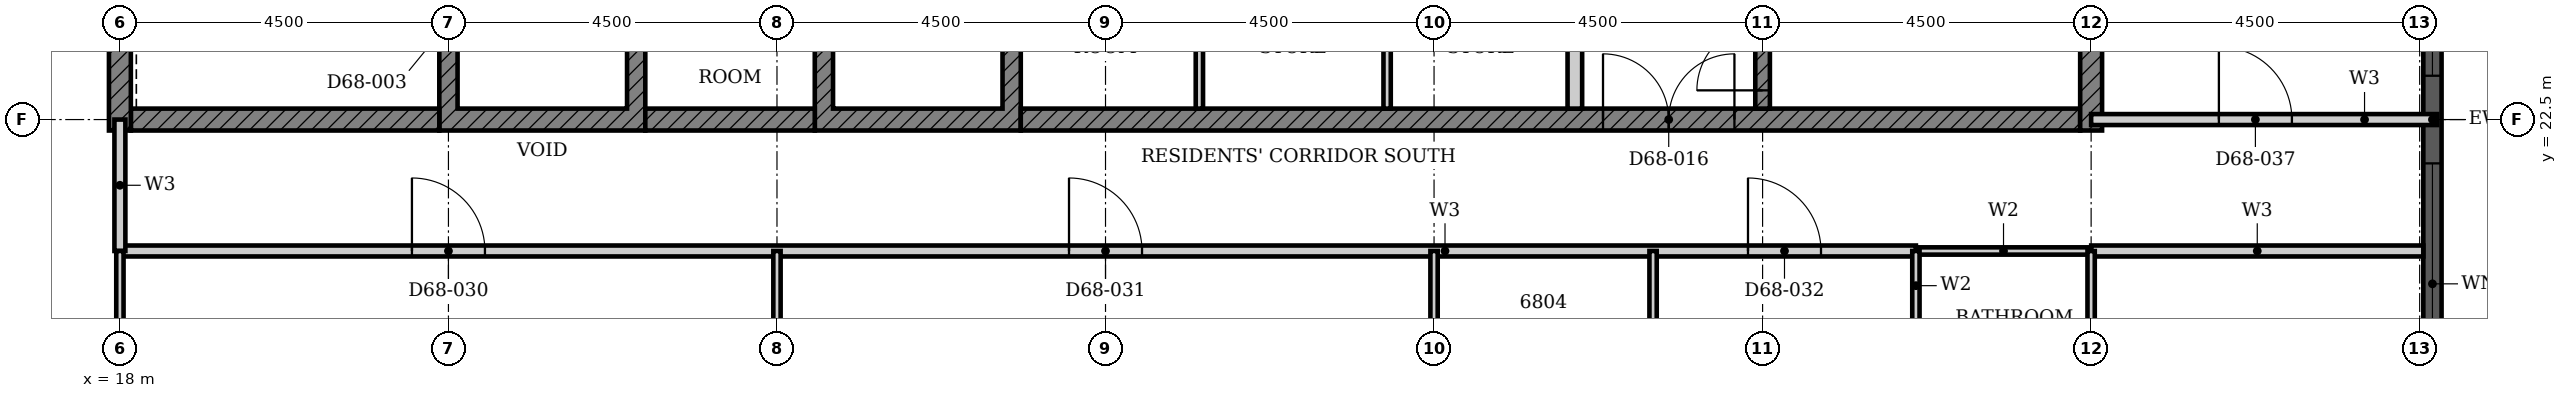
"""IFC4 building model, lengths in metres.
Left out: names, types, materials, properties, quantities, classifications, styles, units other than length and angle.
Written with IfcOpenShell. Run it as: python <this file> out.ifc"""

import sys

from ifc_helpers import new_model, si_unit, direction, frame, frame_2d, origin, place, context, subcontext, project, spatial, polyline, rectangle, outline, extrude, element, fill, save


model = new_model("IFC4")
c1 = context("Model", 3, precision=1e-05, world=origin(), true_north=direction((0.0, 1.0)))
c2 = subcontext(c1, "Body", "Model", "MODEL_VIEW")
j1 = project(units=[si_unit("LENGTHUNIT", "METRE"), si_unit("PLANEANGLEUNIT", "RADIAN")], contexts=[c1])
p1 = place(None, origin())
s1 = spatial("IfcSite", under=j1, at=p1, CompositionType="ELEMENT")
p2 = place(p1, origin())
s2 = spatial("IfcBuilding", under=s1, at=p2, CompositionType="ELEMENT")
p3 = place(p2, frame((0.0, 0.0, 267.5)))
s3 = spatial("IfcBuildingStorey", under=s2, at=p3, CompositionType="ELEMENT", Elevation=267.5)
p4 = place(p3, frame((49.675, 18.3, 0.0), z_axis=(0.0, 0.0, 1.0), x_axis=(0.0, 1.0, 0.0)))
e1 = element("IfcWall", 1, at=p4, inside=s3, PredefinedType="SOLIDWALL", context=c2, shape_type="SweptSolid", body=[
    extrude(rectangle(XDim=8.4, YDim=0.25, at=frame_2d((4.2, 0.0))), origin(), (0.0, 0.0, 1.0), 3.7),
])
p5 = place(p4, frame((0.3, 0.0, 0.45)))
e2 = element("IfcOpeningElement", 2, at=p5, cuts=e1, PredefinedType="OPENING", context=c2, shape_type="SweptSolid", body=[
    extrude(rectangle(XDim=3.3, YDim=2.3, at=frame_2d((1.65, 1.15))), frame((0.0, 0.135, 0.0), z_axis=(0.0, -1.0, 0.0), x_axis=(1.0, 0.0, 0.0)), (0.0, 0.0, 1.0), 0.27),
])
p6 = place(p4, frame((4.8, 0.0, 0.45)))
e3 = element("IfcOpeningElement", 3, at=p6, cuts=e1, PredefinedType="OPENING", context=c2, shape_type="SweptSolid", body=[
    extrude(rectangle(XDim=3.3, YDim=2.3, at=frame_2d((1.65, 1.15))), frame((0.0, 0.135, 0.0), z_axis=(0.0, -1.0, 0.0), x_axis=(1.0, 0.0, 0.0)), (0.0, 0.0, 1.0), 0.27),
])
p7 = place(p3, origin())
e4 = element("IfcWall", 4, at=p7, inside=s3, PredefinedType="SHEAR", context=c2, shape_type="SweptSolid", body=[
    extrude(outline(polyline([(22.375, 22.35), (25.197, 22.35), (25.197, 25.275), (24.947, 25.275), (24.947, 22.65), (22.625, 22.65), (22.625, 25.275), (22.375, 25.275), (22.375, 22.35)])), origin(), (0.0, 0.0, 1.0), 3.4),
])
p8 = place(p3, origin())
e5 = element("IfcWall", 5, at=p8, inside=s3, PredefinedType="SHEAR", context=c2, shape_type="SweptSolid", body=[
    extrude(outline(polyline([(27.518, 22.35), (30.339, 22.35), (30.339, 25.275), (30.089, 25.275), (30.089, 22.65), (27.768, 22.65), (27.768, 25.275), (27.518, 25.275), (27.518, 22.35)])), origin(), (0.0, 0.0, 1.0), 3.4),
])
p9 = place(p3, frame((18.15, 22.5, 0.0), z_axis=(0.0, 0.0, 1.0), x_axis=(1.0, 0.0, 0.0)))
e6 = element("IfcWall", 6, at=p9, inside=s3, PredefinedType="SHEAR", context=c2, shape_type="SweptSolid", body=[
    extrude(rectangle(XDim=4.225, YDim=0.3, at=frame_2d((2.113, 0.0))), origin(), (0.0, 0.0, 1.0), 3.4),
])
p10 = place(p3, frame((25.197, 22.5, 0.0), z_axis=(0.0, 0.0, 1.0), x_axis=(1.0, 0.0, 0.0)))
e7 = element("IfcWall", 7, at=p10, inside=s3, PredefinedType="SHEAR", context=c2, shape_type="SweptSolid", body=[
    extrude(rectangle(XDim=2.321, YDim=0.3, at=frame_2d((1.161, 0.0))), origin(), (0.0, 0.0, 1.0), 3.4),
])
p11 = place(p3, frame((30.339, 22.5, 0.0), z_axis=(0.0, 0.0, 1.0), x_axis=(1.0, 0.0, 0.0)))
e8 = element("IfcWall", 8, at=p11, inside=s3, PredefinedType="SHEAR", context=c2, shape_type="SweptSolid", body=[
    extrude(rectangle(XDim=14.511, YDim=0.3, at=frame_2d((7.255, 0.0))), origin(), (0.0, 0.0, 1.0), 3.4),
])
p12 = place(p11, frame((7.975, 0.0, 0.0)))
e9 = element("IfcOpeningElement", 9, at=p12, cuts=e8, PredefinedType="OPENING", context=c2, shape_type="SweptSolid", body=[
    extrude(rectangle(XDim=1.8, YDim=2.1, at=frame_2d((0.9, 1.05))), frame((0.0, 0.16, 0.0), z_axis=(0.0, -1.0, 0.0), x_axis=(1.0, 0.0, 0.0)), (0.0, 0.0, 1.0), 0.32),
])
for number, where, z_axis, x_axis in (
    (10, (18.0, 22.35, 0.0), (0.0, 0.0, 1.0), (0.0, 1.0, 0.0)),
    (11, (45.0, 22.35, 0.0), (0.0, 0.0, 1.0), (0.0, 1.0, 0.0)),
):
    element("IfcWall", number, at=place(p3, frame(where, z_axis=z_axis, x_axis=x_axis)), inside=s3, PredefinedType="SHEAR", context=c2, shape_type="SweptSolid", body=[
        extrude(rectangle(XDim=9.3, YDim=0.3, at=frame_2d((4.65, 0.0))), origin(), (0.0, 0.0, 1.0), 3.4),
    ])
p13 = place(p3, frame((37.928, 22.65, 0.0), z_axis=(0.0, 0.0, 1.0), x_axis=(0.0, 1.0, 0.0)))
e12 = element("IfcWall", 12, at=p13, inside=s3, PredefinedType="PARTITIONING", context=c2, shape_type="SweptSolid", body=[
    extrude(rectangle(XDim=2.625, YDim=0.2, at=frame_2d((1.312, 0.0))), origin(), (0.0, 0.0, 1.0), 3.4),
])
for number, where, z_axis, x_axis in (
    (13, (32.786, 22.65, 0.0), (0.0, 0.0, 1.0), (0.0, 1.0, 0.0)),
    (14, (35.357, 22.65, 0.0), (0.0, 0.0, 1.0), (0.0, 1.0, 0.0)),
):
    element("IfcWall", number, at=place(p3, frame(where, z_axis=z_axis, x_axis=x_axis)), inside=s3, PredefinedType="PARTITIONING", context=c2, shape_type="SweptSolid", body=[
        extrude(rectangle(XDim=2.625, YDim=0.1, at=frame_2d((1.312, 0.0))), origin(), (0.0, 0.0, 1.0), 3.4),
    ])
p14 = place(p3, frame((40.5, 22.65, 0.0), z_axis=(0.0, 0.0, 1.0), x_axis=(0.0, 1.0, 0.0)))
e15 = element("IfcWall", 15, at=p14, inside=s3, PredefinedType="SHEAR", context=c2, shape_type="SweptSolid", body=[
    extrude(rectangle(XDim=5.825, YDim=0.2, at=frame_2d((2.913, 0.0))), origin(), (0.0, 0.0, 1.0), 3.4),
])
p15 = place(p14, frame((0.25, 0.0, 0.0)))
e16 = element("IfcOpeningElement", 16, at=p15, cuts=e15, PredefinedType="OPENING", context=c2, shape_type="SweptSolid", body=[
    extrude(rectangle(XDim=1.8, YDim=2.1, at=frame_2d((0.9, 1.05))), frame((0.0, 0.11, 0.0), z_axis=(0.0, -1.0, 0.0), x_axis=(1.0, 0.0, 0.0)), (0.0, 0.0, 1.0), 0.22),
])
p16 = place(p3, frame((18.0, 20.7, 0.0), z_axis=(0.0, 0.0, 1.0), x_axis=(1.0, 0.0, 0.0)))
e17 = element("IfcWall", 17, at=p16, inside=s3, PredefinedType="PARTITIONING", context=c2, shape_type="SweptSolid", body=[
    extrude(rectangle(XDim=24.6, YDim=0.15, at=frame_2d((12.3, 0.0))), origin(), (0.0, 0.0, 1.0), 3.4),
])
p17 = place(p16, frame((4.0, 0.0, 0.0)))
e18 = element("IfcOpeningElement", 18, at=p17, cuts=e17, PredefinedType="OPENING", context=c2, shape_type="SweptSolid", body=[
    extrude(rectangle(XDim=1.0, YDim=2.1, at=frame_2d((0.5, 1.05))), frame((0.0, 0.085, 0.0), z_axis=(0.0, -1.0, 0.0), x_axis=(1.0, 0.0, 0.0)), (0.0, 0.0, 1.0), 0.17),
])
p18 = place(p16, frame((13.0, 0.0, 0.0)))
e19 = element("IfcOpeningElement", 19, at=p18, cuts=e17, PredefinedType="OPENING", context=c2, shape_type="SweptSolid", body=[
    extrude(rectangle(XDim=1.0, YDim=2.1, at=frame_2d((0.5, 1.05))), frame((0.0, 0.085, 0.0), z_axis=(0.0, -1.0, 0.0), x_axis=(1.0, 0.0, 0.0)), (0.0, 0.0, 1.0), 0.17),
])
p19 = place(p16, frame((22.3, 0.0, 0.0)))
e20 = element("IfcOpeningElement", 20, at=p19, cuts=e17, PredefinedType="OPENING", context=c2, shape_type="SweptSolid", body=[
    extrude(rectangle(XDim=1.0, YDim=2.2, at=frame_2d((0.5, 1.1))), frame((0.0, 0.085, 0.0), z_axis=(0.0, -1.0, 0.0), x_axis=(1.0, 0.0, 0.0)), (0.0, 0.0, 1.0), 0.17),
])
p20 = place(p3, frame((45.001, 20.7, 0.0), z_axis=(0.0, 0.0, 1.0), x_axis=(1.0, 0.0, 0.0)))
e21 = element("IfcWall", 21, at=p20, inside=s3, PredefinedType="PARTITIONING", context=c2, shape_type="SweptSolid", body=[
    extrude(rectangle(XDim=4.549, YDim=0.15, at=frame_2d((2.274, 0.0))), origin(), (0.0, 0.0, 1.0), 3.4),
])
p21 = place(p3, frame((45.0, 22.5, 0.0), z_axis=(0.0, 0.0, 1.0), x_axis=(1.0, 0.0, 0.0)))
e22 = element("IfcWall", 22, at=p21, inside=s3, PredefinedType="PARTITIONING", context=c2, shape_type="SweptSolid", body=[
    extrude(rectangle(XDim=4.74, YDim=0.15, at=frame_2d((2.37, 0.0))), origin(), (0.0, 0.0, 1.0), 3.4),
])
p22 = place(p21, frame((1.75, 0.0, 0.0)))
e23 = element("IfcOpeningElement", 23, at=p22, cuts=e22, PredefinedType="OPENING", context=c2, shape_type="SweptSolid", body=[
    extrude(rectangle(XDim=1.0, YDim=2.1, at=frame_2d((0.5, 1.05))), frame((0.0, 0.085, 0.0), z_axis=(0.0, -1.0, 0.0), x_axis=(1.0, 0.0, 0.0)), (0.0, 0.0, 1.0), 0.17),
])
p23 = place(p3, frame((18.0, 20.7, 0.0), z_axis=(0.0, 0.0, 1.0), x_axis=(0.0, 1.0, 0.0)))
e24 = element("IfcWall", 24, at=p23, inside=s3, PredefinedType="PARTITIONING", context=c2, shape_type="SweptSolid", body=[
    extrude(rectangle(XDim=1.8, YDim=0.15, at=frame_2d((0.9, 0.0))), origin(), (0.0, 0.0, 1.0), 3.4),
])
p24 = place(p3, frame((18.0, 18.0, 0.0), z_axis=(0.0, 0.0, 1.0), x_axis=(0.0, 1.0, 0.0)))
e25 = element("IfcWall", 25, at=p24, inside=s3, PredefinedType="PARTITIONING", context=c2, shape_type="SweptSolid", body=[
    extrude(rectangle(XDim=2.7, YDim=0.1, at=frame_2d((1.35, 0.0))), origin(), (0.0, 0.0, 1.0), 3.4),
])
for number, where, z_axis, x_axis in (
    (26, (27.0, 13.31, 0.0), (0.0, 0.0, 1.0), (0.0, 1.0, 0.0)),
    (27, (36.0, 13.31, 0.0), (0.0, 0.0, 1.0), (0.0, 1.0, 0.0)),
):
    element("IfcWall", number, at=place(p3, frame(where, z_axis=z_axis, x_axis=x_axis)), inside=s3, PredefinedType="PARTITIONING", context=c2, shape_type="SweptSolid", body=[
        extrude(rectangle(XDim=7.39, YDim=0.1, at=frame_2d((3.695, 0.0))), origin(), (0.0, 0.0, 1.0), 3.4),
    ])
p25 = place(p3, frame((39.0, 18.0, 0.0), z_axis=(0.0, 0.0, 1.0), x_axis=(0.0, 1.0, 0.0)))
e28 = element("IfcWall", 28, at=p25, inside=s3, PredefinedType="PARTITIONING", context=c2, shape_type="SweptSolid", body=[
    extrude(rectangle(XDim=2.7, YDim=0.1, at=frame_2d((1.35, 0.0))), origin(), (0.0, 0.0, 1.0), 3.4),
])
p26 = place(p3, frame((42.6, 20.7, 0.0), z_axis=(0.0, 0.0, 1.0), x_axis=(1.0, 0.0, 0.0)))
e29 = element("IfcWall", 29, at=p26, inside=s3, PredefinedType="PARTITIONING", context=c2, shape_type="SweptSolid", body=[
    extrude(rectangle(XDim=2.4, YDim=0.1, at=frame_2d((1.2, 0.0))), origin(), (0.0, 0.0, 1.0), 3.4),
])
p27 = place(p3, frame((42.6, 18.0, 0.0), z_axis=(0.0, 0.0, 1.0), x_axis=(0.0, 1.0, 0.0)))
e30 = element("IfcWall", 30, at=p27, inside=s3, PredefinedType="PARTITIONING", context=c2, shape_type="SweptSolid", body=[
    extrude(rectangle(XDim=2.7, YDim=0.1, at=frame_2d((1.35, 0.0))), origin(), (0.0, 0.0, 1.0), 3.4),
])
p28 = place(p27, frame((0.95, 0.0, 0.0)))
e31 = element("IfcOpeningElement", 31, at=p28, cuts=e30, PredefinedType="OPENING", context=c2, shape_type="SweptSolid", body=[
    extrude(rectangle(XDim=0.8, YDim=2.1, at=frame_2d((0.4, 1.05))), frame((0.0, 0.06, 0.0), z_axis=(0.0, -1.0, 0.0), x_axis=(1.0, 0.0, 0.0)), (0.0, 0.0, 1.0), 0.12),
])
p29 = place(p3, frame((45.0, 18.0, 0.0), z_axis=(0.0, 0.0, 1.0), x_axis=(0.0, 1.0, 0.0)))
e32 = element("IfcWall", 32, at=p29, inside=s3, PredefinedType="PARTITIONING", context=c2, shape_type="SweptSolid", body=[
    extrude(rectangle(XDim=2.699, YDim=0.1, at=frame_2d((1.35, 0.0))), origin(), (0.0, 0.0, 1.0), 3.4),
])
p30 = place(p5, origin())
e33 = element("IfcWindow", 33, at=p30, inside=s3, PartitioningType="SINGLE_PANEL", PredefinedType="WINDOW", context=c2, shape_type="SweptSolid", body=[
    extrude(rectangle(XDim=3.3, YDim=2.3, at=frame_2d((1.65, 1.15))), frame((0.0, 0.03, 0.0), z_axis=(0.0, -1.0, 0.0), x_axis=(1.0, 0.0, 0.0)), (0.0, 0.0, 1.0), 0.06),
])
fill(e2, e33)
p31 = place(p6, origin())
e34 = element("IfcWindow", 34, at=p31, inside=s3, PartitioningType="SINGLE_PANEL", PredefinedType="WINDOW", context=c2, shape_type="SweptSolid", body=[
    extrude(rectangle(XDim=3.3, YDim=2.3, at=frame_2d((1.65, 1.15))), frame((0.0, 0.03, 0.0), z_axis=(0.0, -1.0, 0.0), x_axis=(1.0, 0.0, 0.0)), (0.0, 0.0, 1.0), 0.06),
])
fill(e3, e34)
p32 = place(p15, origin())
e35 = element("IfcDoor", 35, at=p32, inside=s3, OperationType="DOUBLE_DOOR_SINGLE_SWING", PredefinedType="DOOR", context=c2, shape_type="SweptSolid", body=[
    extrude(rectangle(XDim=1.8, YDim=2.1, at=frame_2d((0.9, 1.05))), frame((0.0, 0.025, 0.0), z_axis=(0.0, -1.0, 0.0), x_axis=(1.0, 0.0, 0.0)), (0.0, 0.0, 1.0), 0.05),
])
fill(e16, e35)
p33 = place(p12, origin())
e36 = element("IfcDoor", 36, at=p33, inside=s3, OperationType="DOUBLE_DOOR_SINGLE_SWING", PredefinedType="DOOR", context=c2, shape_type="SweptSolid", body=[
    extrude(rectangle(XDim=1.8, YDim=2.1, at=frame_2d((0.9, 1.05))), frame((0.0, 0.025, 0.0), z_axis=(0.0, -1.0, 0.0), x_axis=(1.0, 0.0, 0.0)), (0.0, 0.0, 1.0), 0.05),
])
fill(e9, e36)
p34 = place(p17, origin())
e37 = element("IfcDoor", 37, at=p34, inside=s3, OperationType="SINGLE_SWING_LEFT", PredefinedType="DOOR", context=c2, shape_type="SweptSolid", body=[
    extrude(rectangle(XDim=1.0, YDim=2.1, at=frame_2d((0.5, 1.05))), frame((0.0, 0.025, 0.0), z_axis=(0.0, -1.0, 0.0), x_axis=(1.0, 0.0, 0.0)), (0.0, 0.0, 1.0), 0.05),
])
fill(e18, e37)
p35 = place(p18, origin())
e38 = element("IfcDoor", 38, at=p35, inside=s3, OperationType="SINGLE_SWING_LEFT", PredefinedType="DOOR", context=c2, shape_type="SweptSolid", body=[
    extrude(rectangle(XDim=1.0, YDim=2.1, at=frame_2d((0.5, 1.05))), frame((0.0, 0.025, 0.0), z_axis=(0.0, -1.0, 0.0), x_axis=(1.0, 0.0, 0.0)), (0.0, 0.0, 1.0), 0.05),
])
fill(e19, e38)
p36 = place(p19, origin())
e39 = element("IfcDoor", 39, at=p36, inside=s3, OperationType="SINGLE_SWING_LEFT", PredefinedType="DOOR", context=c2, shape_type="SweptSolid", body=[
    extrude(rectangle(XDim=1.0, YDim=2.2, at=frame_2d((0.5, 1.1))), frame((0.0, 0.025, 0.0), z_axis=(0.0, -1.0, 0.0), x_axis=(1.0, 0.0, 0.0)), (0.0, 0.0, 1.0), 0.05),
])
fill(e20, e39)
p37 = place(p22, origin())
e40 = element("IfcDoor", 40, at=p37, inside=s3, OperationType="SINGLE_SWING_LEFT", PredefinedType="DOOR", context=c2, shape_type="SweptSolid", body=[
    extrude(rectangle(XDim=1.0, YDim=2.1, at=frame_2d((0.5, 1.05))), frame((0.0, 0.025, 0.0), z_axis=(0.0, -1.0, 0.0), x_axis=(1.0, 0.0, 0.0)), (0.0, 0.0, 1.0), 0.05),
])
fill(e23, e40)
save(model, sys.argv[1])
